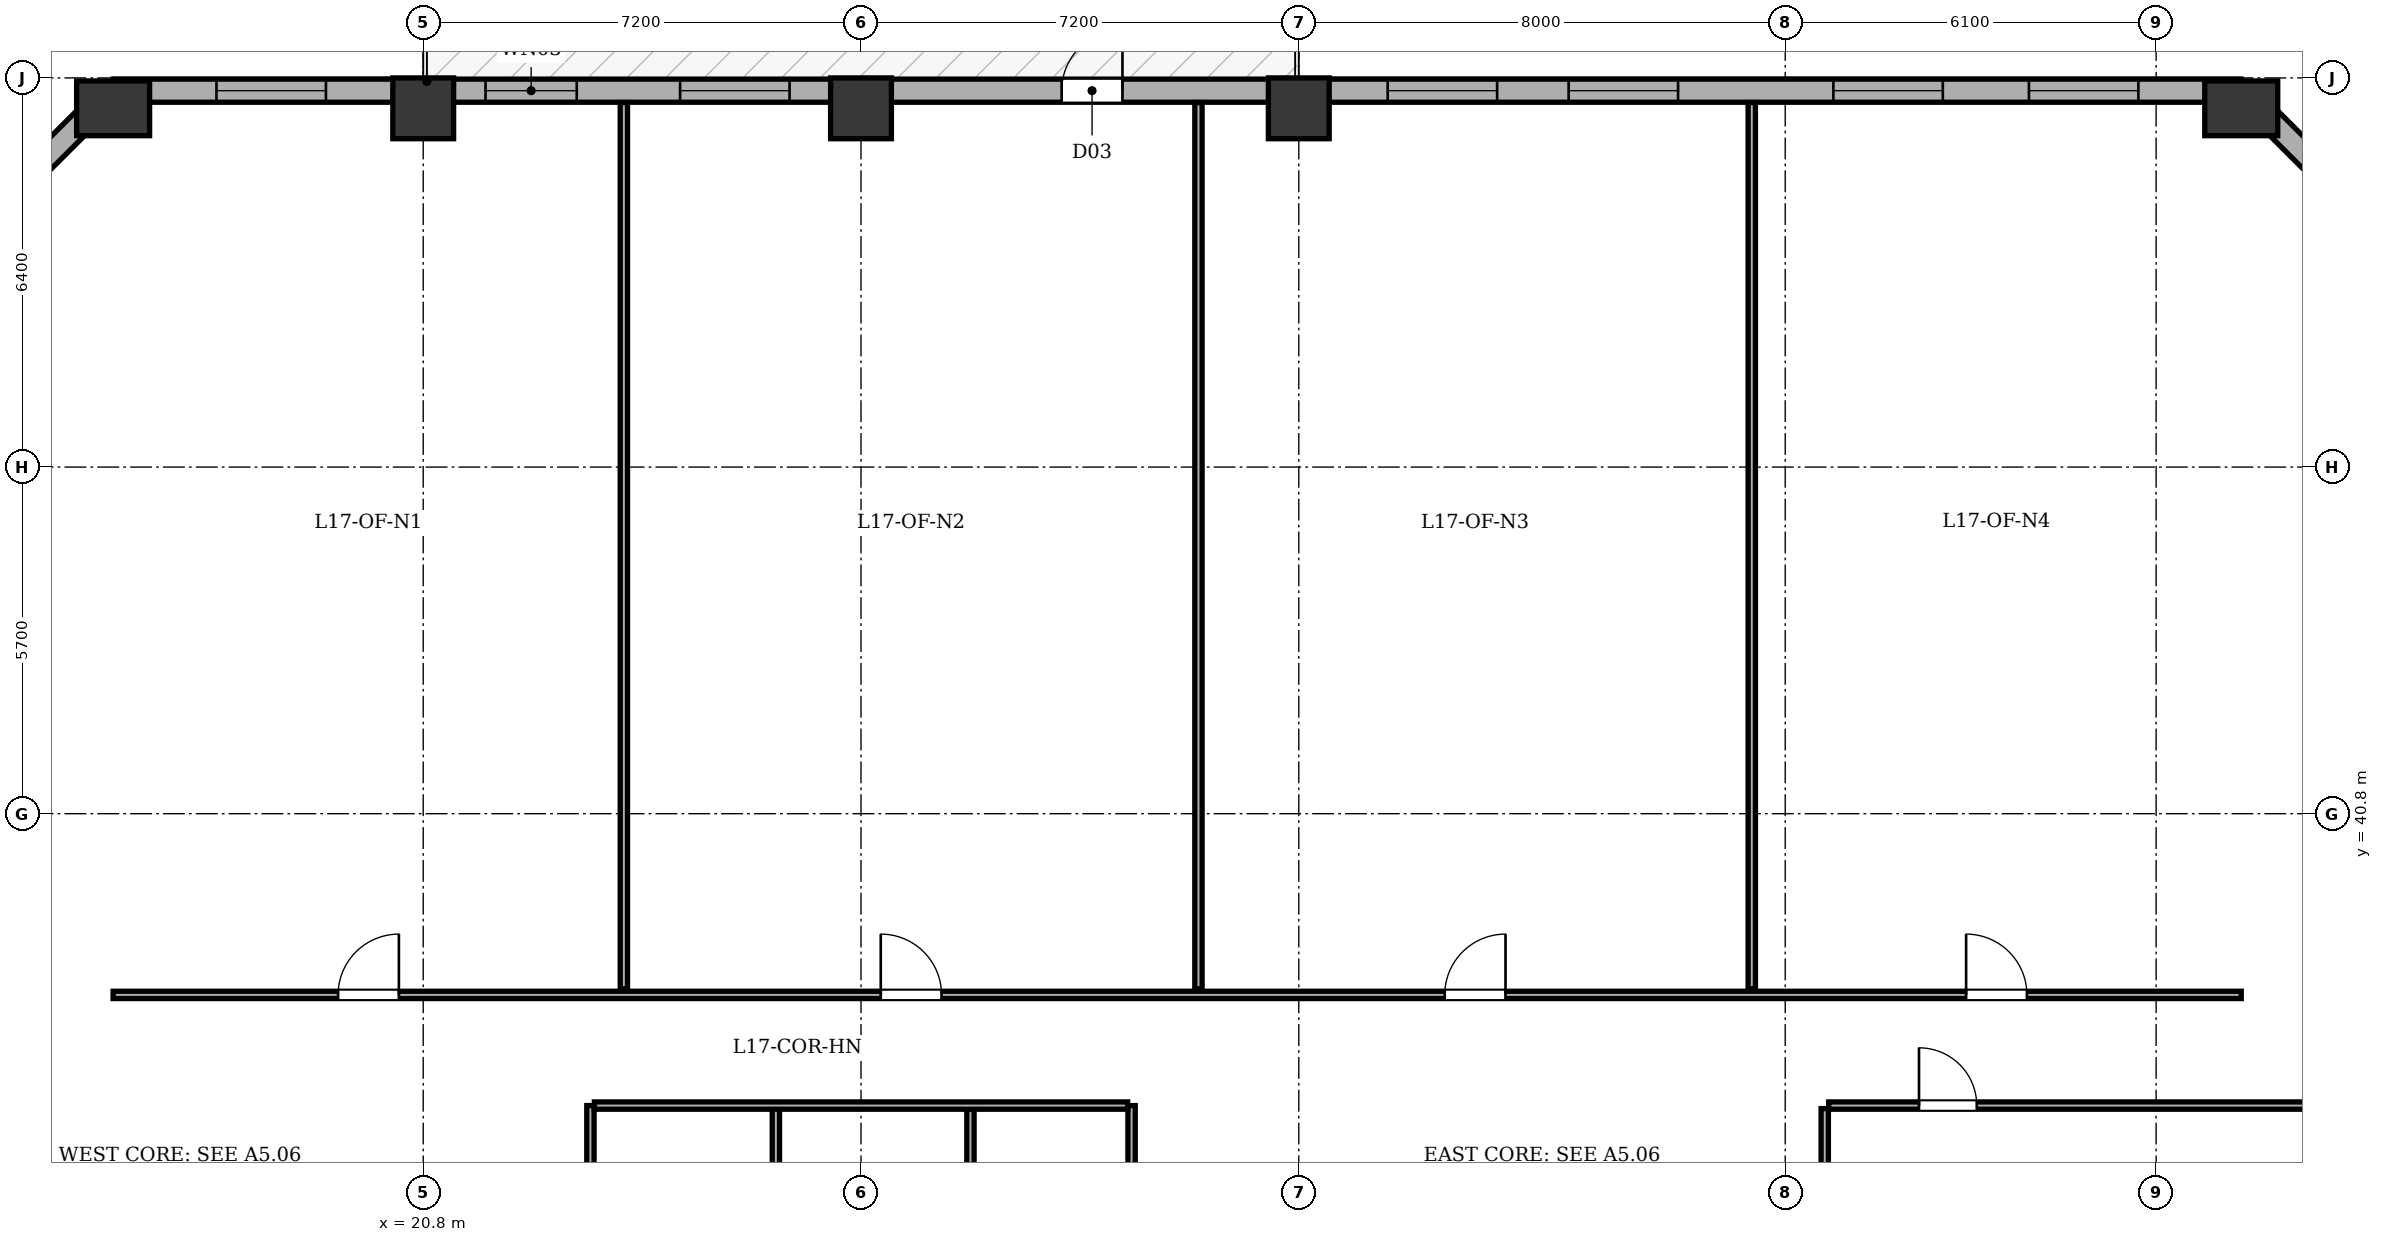
"""IFC4 building model, lengths in metres.
Left out: names, types, materials, properties, quantities, classifications, styles, units other than length and angle.
Written with IfcOpenShell. Run it as: python <this file> out.ifc"""

import sys

from ifc_helpers import new_model, si_unit, direction, frame, frame_2d, origin, origin_2d, place, context, subcontext, project, spatial, rectangle, extrude, element, fill, save


model = new_model("IFC4")
c1 = context("Model", 3, precision=1e-05, world=origin(), true_north=direction((0.0, 1.0)))
c2 = subcontext(c1, "Body", "Model", "MODEL_VIEW")
j1 = project(units=[si_unit("LENGTHUNIT", "METRE"), si_unit("PLANEANGLEUNIT", "RADIAN")], contexts=[c1])
p1 = place(None, origin())
s1 = spatial("IfcSite", under=j1, at=p1, CompositionType="ELEMENT")
p2 = place(p1, origin())
s2 = spatial("IfcBuilding", under=s1, at=p2, CompositionType="ELEMENT")
p3 = place(p2, frame((0.0, 0.0, 71.1)))
s3 = spatial("IfcBuildingStorey", under=s2, at=p3, CompositionType="ELEMENT", Elevation=71.1)
p4 = place(p3, frame((15.7, 52.4, 0.0), z_axis=(0.0, 0.0, 1.0), x_axis=(1.0, 0.0, 0.0)))
e1 = element("IfcColumn", 1, at=p4, inside=s3, PredefinedType="COLUMN", context=c2, shape_type="SweptSolid", body=[
    extrude(rectangle(XDim=0.9, YDim=1.2, at=origin_2d()), origin(), (0.0, 0.0, 1.0), 3.9),
])
for number, where, z_axis, x_axis in (
    (2, (20.8, 52.4, 0.0), (0.0, 0.0, 1.0), (1.0, 0.0, 0.0)),
    (3, (28.0, 52.4, 0.0), (0.0, 0.0, 1.0), (1.0, 0.0, 0.0)),
    (4, (35.2, 52.4, 0.0), (0.0, 0.0, 1.0), (1.0, 0.0, 0.0)),
):
    element("IfcColumn", number, at=place(p3, frame(where, z_axis=z_axis, x_axis=x_axis)), inside=s3, PredefinedType="COLUMN", context=c2, shape_type="SweptSolid", body=[
        extrude(rectangle(XDim=1.0, YDim=1.0, at=origin_2d()), origin(), (0.0, 0.0, 1.0), 3.9),
    ])
p5 = place(p3, frame((50.7, 52.4, 0.0), z_axis=(0.0, 0.0, 1.0), x_axis=(1.0, 0.0, 0.0)))
e5 = element("IfcColumn", 5, at=p5, inside=s3, PredefinedType="COLUMN", context=c2, shape_type="SweptSolid", body=[
    extrude(rectangle(XDim=0.9, YDim=1.2, at=origin_2d()), origin(), (0.0, 0.0, 1.0), 3.9),
])
p6 = place(p3, frame((10.91, 47.9, 0.0), z_axis=(0.0, 0.0, 1.0), x_axis=(0.707106781187, 0.707106781187, 0.0)))
e6 = element("IfcWall", 6, at=p6, inside=s3, PredefinedType="STANDARD", context=c2, shape_type="SweptSolid", body=[
    extrude(rectangle(XDim=6.774, YDim=0.38, at=frame_2d((3.387, 0.0))), origin(), (0.0, 0.0, 1.0), 3.135),
])
p7 = place(p6, frame((2.687, 0.0, 0.8)))
e7 = element("IfcOpeningElement", 7, at=p7, cuts=e6, PredefinedType="OPENING", context=c2, shape_type="SweptSolid", body=[
    extrude(rectangle(XDim=1.4, YDim=1.65, at=frame_2d((0.7, 0.825))), frame((0.0, 0.2, 0.0), z_axis=(0.0, -1.0, 0.0), x_axis=(1.0, 0.0, 0.0)), (0.0, 0.0, 1.0), 0.4),
])
p8 = place(p3, frame((15.7, 52.69, 0.0), z_axis=(0.0, 0.0, 1.0), x_axis=(1.0, 0.0, 0.0)))
e8 = element("IfcWall", 8, at=p8, inside=s3, PredefinedType="STANDARD", context=c2, shape_type="SweptSolid", body=[
    extrude(rectangle(XDim=35.0, YDim=0.38, at=frame_2d((17.5, 0.0))), origin(), (0.0, 0.0, 1.0), 3.135),
])
p9 = place(p8, frame((15.6, 0.0, 0.0)))
e9 = element("IfcOpeningElement", 9, at=p9, cuts=e8, PredefinedType="OPENING", context=c2, shape_type="SweptSolid", body=[
    extrude(rectangle(XDim=1.0, YDim=2.02, at=frame_2d((0.5, 1.01))), frame((0.0, 0.2, 0.0), z_axis=(0.0, -1.0, 0.0), x_axis=(1.0, 0.0, 0.0)), (0.0, 0.0, 1.0), 0.4),
])
p10 = place(p8, frame((1.7, 0.0, 0.8)))
e10 = element("IfcOpeningElement", 10, at=p10, cuts=e8, PredefinedType="OPENING", context=c2, shape_type="SweptSolid", body=[
    extrude(rectangle(XDim=1.8, YDim=1.9, at=frame_2d((0.9, 0.95))), frame((0.0, 0.2, 0.0), z_axis=(0.0, -1.0, 0.0), x_axis=(1.0, 0.0, 0.0)), (0.0, 0.0, 1.0), 0.4),
])
p11 = place(p8, frame((6.125, 0.0, 0.8)))
e11 = element("IfcOpeningElement", 11, at=p11, cuts=e8, PredefinedType="OPENING", context=c2, shape_type="SweptSolid", body=[
    extrude(rectangle(XDim=1.5, YDim=1.9, at=frame_2d((0.75, 0.95))), frame((0.0, 0.2, 0.0), z_axis=(0.0, -1.0, 0.0), x_axis=(1.0, 0.0, 0.0)), (0.0, 0.0, 1.0), 0.4),
])
p12 = place(p8, frame((9.325, 0.0, 0.8)))
e12 = element("IfcOpeningElement", 12, at=p12, cuts=e8, PredefinedType="OPENING", context=c2, shape_type="SweptSolid", body=[
    extrude(rectangle(XDim=1.8, YDim=1.9, at=frame_2d((0.9, 0.95))), frame((0.0, 0.2, 0.0), z_axis=(0.0, -1.0, 0.0), x_axis=(1.0, 0.0, 0.0)), (0.0, 0.0, 1.0), 0.4),
])
p13 = place(p8, frame((20.962, 0.0, 0.8)))
e13 = element("IfcOpeningElement", 13, at=p13, cuts=e8, PredefinedType="OPENING", context=c2, shape_type="SweptSolid", body=[
    extrude(rectangle(XDim=1.8, YDim=1.9, at=frame_2d((0.9, 0.95))), frame((0.0, 0.2, 0.0), z_axis=(0.0, -1.0, 0.0), x_axis=(1.0, 0.0, 0.0)), (0.0, 0.0, 1.0), 0.4),
])
p14 = place(p8, frame((23.938, 0.0, 0.8)))
e14 = element("IfcOpeningElement", 14, at=p14, cuts=e8, PredefinedType="OPENING", context=c2, shape_type="SweptSolid", body=[
    extrude(rectangle(XDim=1.8, YDim=1.9, at=frame_2d((0.9, 0.95))), frame((0.0, 0.2, 0.0), z_axis=(0.0, -1.0, 0.0), x_axis=(1.0, 0.0, 0.0)), (0.0, 0.0, 1.0), 0.4),
])
p15 = place(p8, frame((28.292, 0.0, 0.8)))
e15 = element("IfcOpeningElement", 15, at=p15, cuts=e8, PredefinedType="OPENING", context=c2, shape_type="SweptSolid", body=[
    extrude(rectangle(XDim=1.8, YDim=1.9, at=frame_2d((0.9, 0.95))), frame((0.0, 0.2, 0.0), z_axis=(0.0, -1.0, 0.0), x_axis=(1.0, 0.0, 0.0)), (0.0, 0.0, 1.0), 0.4),
])
p16 = place(p8, frame((31.508, 0.0, 0.8)))
e16 = element("IfcOpeningElement", 16, at=p16, cuts=e8, PredefinedType="OPENING", context=c2, shape_type="SweptSolid", body=[
    extrude(rectangle(XDim=1.8, YDim=1.9, at=frame_2d((0.9, 0.95))), frame((0.0, 0.2, 0.0), z_axis=(0.0, -1.0, 0.0), x_axis=(1.0, 0.0, 0.0)), (0.0, 0.0, 1.0), 0.4),
])
p17 = place(p3, frame((50.7, 52.69, 0.0), z_axis=(0.0, 0.0, 1.0), x_axis=(0.707106781187, -0.707106781187, 0.0)))
e17 = element("IfcWall", 17, at=p17, inside=s3, PredefinedType="STANDARD", context=c2, shape_type="SweptSolid", body=[
    extrude(rectangle(XDim=6.774, YDim=0.38, at=frame_2d((3.387, 0.0))), origin(), (0.0, 0.0, 1.0), 3.135),
])
p18 = place(p17, frame((2.687, 0.0, 0.8)))
e18 = element("IfcOpeningElement", 18, at=p18, cuts=e17, PredefinedType="OPENING", context=c2, shape_type="SweptSolid", body=[
    extrude(rectangle(XDim=1.4, YDim=1.65, at=frame_2d((0.7, 0.825))), frame((0.0, 0.2, 0.0), z_axis=(0.0, -1.0, 0.0), x_axis=(1.0, 0.0, 0.0)), (0.0, 0.0, 1.0), 0.4),
])
for number, where, z_axis, x_axis in (
    (19, (23.55, 24.715, 0.0), (0.0, 0.0, 1.0), (0.0, 1.0, 0.0)),
    (20, (32.45, 24.715, 0.0), (0.0, 0.0, 1.0), (0.0, 1.0, 0.0)),
    (21, (26.6, 24.715, 0.0), (0.0, 0.0, 1.0), (0.0, 1.0, 0.0)),
):
    element("IfcWall", number, at=place(p3, frame(where, z_axis=z_axis, x_axis=x_axis)), inside=s3, PredefinedType="PARTITIONING", context=c2, shape_type="SweptSolid", body=[
        extrude(rectangle(XDim=11.285, YDim=0.12, at=frame_2d((5.643, 0.0))), origin(), (0.0, 0.0, 1.0), 3.6),
    ])
p19 = place(p3, frame((29.8, 24.715, 0.0), z_axis=(0.0, 0.0, 1.0), x_axis=(0.0, 1.0, 0.0)))
e22 = element("IfcWall", 22, at=p19, inside=s3, PredefinedType="PARTITIONING", context=c2, shape_type="SweptSolid", body=[
    extrude(rectangle(XDim=11.285, YDim=0.12, at=frame_2d((5.643, 0.0))), origin(), (0.0, 0.0, 1.0), 3.135),
])
p20 = place(p3, frame((23.615, 36.0, 0.0), z_axis=(0.0, 0.0, 1.0), x_axis=(1.0, 0.0, 0.0)))
e23 = element("IfcWall", 23, at=p20, inside=s3, PredefinedType="PARTITIONING", context=c2, shape_type="SweptSolid", body=[
    extrude(rectangle(XDim=8.77, YDim=0.12, at=frame_2d((4.385, 0.0))), origin(), (0.0, 0.0, 1.0), 3.6),
])
p21 = place(p3, frame((15.7, 37.82, 0.0), z_axis=(0.0, 0.0, 1.0), x_axis=(1.0, 0.0, 0.0)))
e24 = element("IfcWall", 24, at=p21, inside=s3, PredefinedType="PARTITIONING", context=c2, shape_type="SweptSolid", body=[
    extrude(rectangle(XDim=35.0, YDim=0.12, at=frame_2d((17.5, 0.0))), origin(), (0.0, 0.0, 1.0), 3.6),
])
p22 = place(p21, frame((3.7, 0.0, 0.0)))
e25 = element("IfcOpeningElement", 25, at=p22, cuts=e24, PredefinedType="OPENING", context=c2, shape_type="SweptSolid", body=[
    extrude(rectangle(XDim=1.0, YDim=2.1, at=frame_2d((0.5, 1.05))), frame((0.0, 0.07, 0.0), z_axis=(0.0, -1.0, 0.0), x_axis=(1.0, 0.0, 0.0)), (0.0, 0.0, 1.0), 0.14),
])
p23 = place(p21, frame((12.625, 0.0, 0.0)))
e26 = element("IfcOpeningElement", 26, at=p23, cuts=e24, PredefinedType="OPENING", context=c2, shape_type="SweptSolid", body=[
    extrude(rectangle(XDim=1.0, YDim=2.1, at=frame_2d((0.5, 1.05))), frame((0.0, 0.07, 0.0), z_axis=(0.0, -1.0, 0.0), x_axis=(1.0, 0.0, 0.0)), (0.0, 0.0, 1.0), 0.14),
])
p24 = place(p21, frame((21.9, 0.0, 0.0)))
e27 = element("IfcOpeningElement", 27, at=p24, cuts=e24, PredefinedType="OPENING", context=c2, shape_type="SweptSolid", body=[
    extrude(rectangle(XDim=1.0, YDim=2.1, at=frame_2d((0.5, 1.05))), frame((0.0, 0.07, 0.0), z_axis=(0.0, -1.0, 0.0), x_axis=(1.0, 0.0, 0.0)), (0.0, 0.0, 1.0), 0.14),
])
p25 = place(p21, frame((30.475, 0.0, 0.0)))
e28 = element("IfcOpeningElement", 28, at=p25, cuts=e24, PredefinedType="OPENING", context=c2, shape_type="SweptSolid", body=[
    extrude(rectangle(XDim=1.0, YDim=2.1, at=frame_2d((0.5, 1.05))), frame((0.0, 0.07, 0.0), z_axis=(0.0, -1.0, 0.0), x_axis=(1.0, 0.0, 0.0)), (0.0, 0.0, 1.0), 0.14),
])
for number, where, z_axis, x_axis in (
    (29, (24.1, 37.92, 0.0), (0.0, 0.0, 1.0), (0.0, 1.0, 0.0)),
    (30, (33.55, 37.92, 0.0), (0.0, 0.0, 1.0), (0.0, 1.0, 0.0)),
):
    element("IfcWall", number, at=place(p3, frame(where, z_axis=z_axis, x_axis=x_axis)), inside=s3, PredefinedType="PARTITIONING", context=c2, shape_type="SweptSolid", body=[
        extrude(rectangle(XDim=14.575, YDim=0.12, at=frame_2d((7.288, 0.0))), origin(), (0.0, 0.0, 1.0), 3.135),
    ])
p26 = place(p3, frame((42.65, 37.92, 0.0), z_axis=(0.0, 0.0, 1.0), x_axis=(0.0, 1.0, 0.0)))
e31 = element("IfcWall", 31, at=p26, inside=s3, PredefinedType="PARTITIONING", context=c2, shape_type="SweptSolid", body=[
    extrude(rectangle(XDim=14.575, YDim=0.12, at=frame_2d((7.288, 0.0))), origin(), (0.0, 0.0, 1.0), 3.6),
])
p27 = place(p3, frame((43.85, 18.45, 0.0), z_axis=(0.0, 0.0, 1.0), x_axis=(0.0, 1.0, 0.0)))
e32 = element("IfcWall", 32, at=p27, inside=s3, PredefinedType="PARTITIONING", context=c2, shape_type="SweptSolid", body=[
    extrude(rectangle(XDim=17.5, YDim=0.12, at=frame_2d((8.75, 0.0))), origin(), (0.0, 0.0, 1.0), 3.6),
])
p28 = place(p3, frame((43.915, 36.0, 0.0), z_axis=(0.0, 0.0, 1.0), x_axis=(1.0, 0.0, 0.0)))
e33 = element("IfcWall", 33, at=p28, inside=s3, PredefinedType="PARTITIONING", context=c2, shape_type="SweptSolid", body=[
    extrude(rectangle(XDim=11.38, YDim=0.12, at=frame_2d((5.69, 0.0))), origin(), (0.0, 0.0, 1.0), 3.6),
])
p29 = place(p28, frame((1.485, 0.0, 0.0)))
e34 = element("IfcOpeningElement", 34, at=p29, cuts=e33, PredefinedType="OPENING", context=c2, shape_type="SweptSolid", body=[
    extrude(rectangle(XDim=0.95, YDim=2.1, at=frame_2d((0.475, 1.05))), frame((0.0, 0.07, 0.0), z_axis=(0.0, -1.0, 0.0), x_axis=(1.0, 0.0, 0.0)), (0.0, 0.0, 1.0), 0.14),
])
p30 = place(p9, origin())
e35 = element("IfcDoor", 35, at=p30, inside=s3, OperationType="SINGLE_SWING_RIGHT", PredefinedType="DOOR", context=c2, shape_type="SweptSolid", body=[
    extrude(rectangle(XDim=1.0, YDim=2.02, at=frame_2d((0.5, 1.01))), frame((0.0, 0.025, 0.0), z_axis=(0.0, -1.0, 0.0), x_axis=(1.0, 0.0, 0.0)), (0.0, 0.0, 1.0), 0.05),
])
fill(e9, e35)
p31 = place(p10, origin())
e36 = element("IfcWindow", 36, at=p31, inside=s3, PartitioningType="SINGLE_PANEL", PredefinedType="WINDOW", context=c2, shape_type="SweptSolid", body=[
    extrude(rectangle(XDim=1.8, YDim=1.9, at=frame_2d((0.9, 0.95))), frame((0.0, -0.01, 0.0), z_axis=(0.0, -1.0, 0.0), x_axis=(1.0, 0.0, 0.0)), (0.0, 0.0, 1.0), 0.06),
])
fill(e10, e36)
p32 = place(p11, origin())
e37 = element("IfcWindow", 37, at=p32, inside=s3, PartitioningType="SINGLE_PANEL", PredefinedType="WINDOW", context=c2, shape_type="SweptSolid", body=[
    extrude(rectangle(XDim=1.5, YDim=1.9, at=frame_2d((0.75, 0.95))), frame((0.0, -0.01, 0.0), z_axis=(0.0, -1.0, 0.0), x_axis=(1.0, 0.0, 0.0)), (0.0, 0.0, 1.0), 0.06),
])
fill(e11, e37)
p33 = place(p12, origin())
e38 = element("IfcWindow", 38, at=p33, inside=s3, PartitioningType="SINGLE_PANEL", PredefinedType="WINDOW", context=c2, shape_type="SweptSolid", body=[
    extrude(rectangle(XDim=1.8, YDim=1.9, at=frame_2d((0.9, 0.95))), frame((0.0, -0.01, 0.0), z_axis=(0.0, -1.0, 0.0), x_axis=(1.0, 0.0, 0.0)), (0.0, 0.0, 1.0), 0.06),
])
fill(e12, e38)
p34 = place(p13, origin())
e39 = element("IfcWindow", 39, at=p34, inside=s3, PartitioningType="SINGLE_PANEL", PredefinedType="WINDOW", context=c2, shape_type="SweptSolid", body=[
    extrude(rectangle(XDim=1.8, YDim=1.9, at=frame_2d((0.9, 0.95))), frame((0.0, -0.01, 0.0), z_axis=(0.0, -1.0, 0.0), x_axis=(1.0, 0.0, 0.0)), (0.0, 0.0, 1.0), 0.06),
])
fill(e13, e39)
p35 = place(p14, origin())
e40 = element("IfcWindow", 40, at=p35, inside=s3, PartitioningType="SINGLE_PANEL", PredefinedType="WINDOW", context=c2, shape_type="SweptSolid", body=[
    extrude(rectangle(XDim=1.8, YDim=1.9, at=frame_2d((0.9, 0.95))), frame((0.0, -0.01, 0.0), z_axis=(0.0, -1.0, 0.0), x_axis=(1.0, 0.0, 0.0)), (0.0, 0.0, 1.0), 0.06),
])
fill(e14, e40)
p36 = place(p15, origin())
e41 = element("IfcWindow", 41, at=p36, inside=s3, PartitioningType="SINGLE_PANEL", PredefinedType="WINDOW", context=c2, shape_type="SweptSolid", body=[
    extrude(rectangle(XDim=1.8, YDim=1.9, at=frame_2d((0.9, 0.95))), frame((0.0, -0.01, 0.0), z_axis=(0.0, -1.0, 0.0), x_axis=(1.0, 0.0, 0.0)), (0.0, 0.0, 1.0), 0.06),
])
fill(e15, e41)
p37 = place(p16, origin())
e42 = element("IfcWindow", 42, at=p37, inside=s3, PartitioningType="SINGLE_PANEL", PredefinedType="WINDOW", context=c2, shape_type="SweptSolid", body=[
    extrude(rectangle(XDim=1.8, YDim=1.9, at=frame_2d((0.9, 0.95))), frame((0.0, -0.01, 0.0), z_axis=(0.0, -1.0, 0.0), x_axis=(1.0, 0.0, 0.0)), (0.0, 0.0, 1.0), 0.06),
])
fill(e16, e42)
p38 = place(p22, origin())
e43 = element("IfcDoor", 43, at=p38, inside=s3, OperationType="SINGLE_SWING_RIGHT", PredefinedType="DOOR", context=c2, shape_type="SweptSolid", body=[
    extrude(rectangle(XDim=1.0, YDim=2.1, at=frame_2d((0.5, 1.05))), frame((0.0, 0.025, 0.0), z_axis=(0.0, -1.0, 0.0), x_axis=(1.0, 0.0, 0.0)), (0.0, 0.0, 1.0), 0.05),
])
fill(e25, e43)
p39 = place(p23, origin())
e44 = element("IfcDoor", 44, at=p39, inside=s3, OperationType="SINGLE_SWING_LEFT", PredefinedType="DOOR", context=c2, shape_type="SweptSolid", body=[
    extrude(rectangle(XDim=1.0, YDim=2.1, at=frame_2d((0.5, 1.05))), frame((0.0, 0.025, 0.0), z_axis=(0.0, -1.0, 0.0), x_axis=(1.0, 0.0, 0.0)), (0.0, 0.0, 1.0), 0.05),
])
fill(e26, e44)
p40 = place(p24, origin())
e45 = element("IfcDoor", 45, at=p40, inside=s3, OperationType="SINGLE_SWING_RIGHT", PredefinedType="DOOR", context=c2, shape_type="SweptSolid", body=[
    extrude(rectangle(XDim=1.0, YDim=2.1, at=frame_2d((0.5, 1.05))), frame((0.0, 0.025, 0.0), z_axis=(0.0, -1.0, 0.0), x_axis=(1.0, 0.0, 0.0)), (0.0, 0.0, 1.0), 0.05),
])
fill(e27, e45)
p41 = place(p25, origin())
e46 = element("IfcDoor", 46, at=p41, inside=s3, OperationType="SINGLE_SWING_LEFT", PredefinedType="DOOR", context=c2, shape_type="SweptSolid", body=[
    extrude(rectangle(XDim=1.0, YDim=2.1, at=frame_2d((0.5, 1.05))), frame((0.0, 0.025, 0.0), z_axis=(0.0, -1.0, 0.0), x_axis=(1.0, 0.0, 0.0)), (0.0, 0.0, 1.0), 0.05),
])
fill(e28, e46)
p42 = place(p29, origin())
e47 = element("IfcDoor", 47, at=p42, inside=s3, OperationType="SINGLE_SWING_LEFT", PredefinedType="DOOR", context=c2, shape_type="SweptSolid", body=[
    extrude(rectangle(XDim=0.95, YDim=2.1, at=frame_2d((0.475, 1.05))), frame((0.0, 0.025, 0.0), z_axis=(0.0, -1.0, 0.0), x_axis=(1.0, 0.0, 0.0)), (0.0, 0.0, 1.0), 0.05),
])
fill(e34, e47)
save(model, sys.argv[1])
